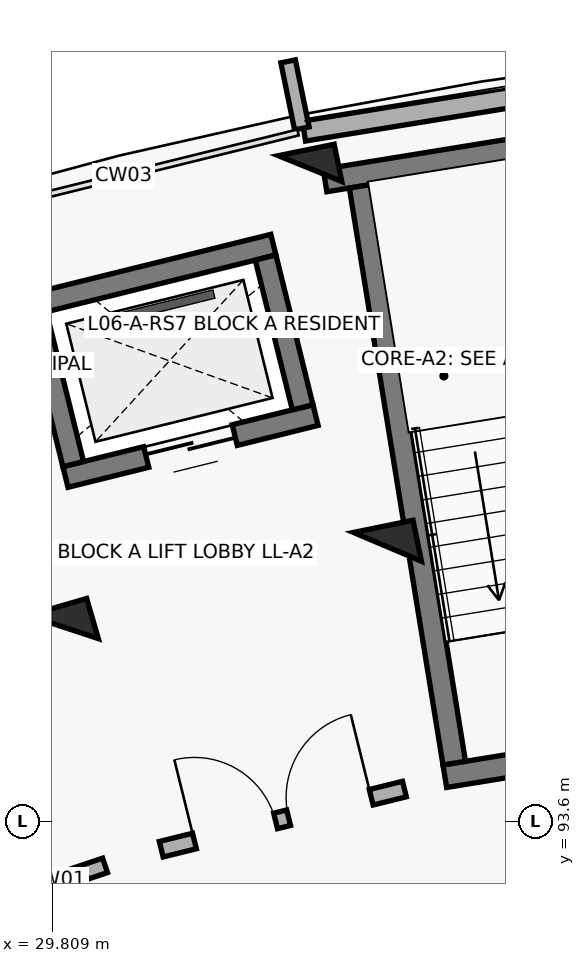
"""IFC4 building model, lengths in metres.
Left out: names, types, materials, properties, quantities, classifications, styles, units other than length and angle.
Written with IfcOpenShell. Run it as: python <this file> out.ifc"""

import sys

from ifc_helpers import new_model, si_unit, direction, frame, frame_2d, origin, origin_2d, place, context, subcontext, project, spatial, rectangle, extrude, element, fill, save


model = new_model("IFC4")
c1 = context("Model", 3, precision=1e-05, world=origin(), true_north=direction((0.0, 1.0)))
c2 = subcontext(c1, "Body", "Model", "MODEL_VIEW")
j1 = project(units=[si_unit("LENGTHUNIT", "METRE"), si_unit("PLANEANGLEUNIT", "RADIAN")], contexts=[c1])
p1 = place(None, origin())
s1 = spatial("IfcSite", under=j1, at=p1, CompositionType="ELEMENT")
p2 = place(p1, origin())
s2 = spatial("IfcBuilding", under=s1, at=p2, CompositionType="ELEMENT")
p3 = place(p2, frame((0.0, 0.0, 20.5)))
s3 = spatial("IfcBuildingStorey", under=s2, at=p3, CompositionType="ELEMENT", Elevation=20.5)
for number, where, z_axis, x_axis in (
    (1, (29.954, 96.153, 0.0), (0.0, 0.0, 1.0), (-0.28, 0.96, 0.0)),
    (2, (34.219, 97.209, 0.0), (0.0, 0.0, 1.0), (-0.2, 0.98, 0.0)),
):
    element("IfcColumn", number, at=place(p3, frame(where, z_axis=z_axis, x_axis=x_axis)), inside=s3, PredefinedType="COLUMN", context=c2, shape_type="SweptSolid", body=[
        extrude(rectangle(XDim=0.55, YDim=0.8, at=origin_2d()), origin(), (0.0, 0.0, 1.0), 3.1),
    ])
p4 = place(p3, frame((33.201, 102.186, 0.0), z_axis=(0.0, 0.0, 1.0), x_axis=(-0.200393999665, 0.979715389742, 0.0)))
e3 = element("IfcColumn", 3, at=p4, inside=s3, PredefinedType="COLUMN", context=c2, shape_type="SweptSolid", body=[
    extrude(rectangle(XDim=0.5, YDim=0.75, at=origin_2d()), origin(), (0.0, 0.0, 1.0), 3.1),
])
p5 = place(p3, frame((33.12, 102.679, 0.0), z_axis=(0.0, 0.0, 1.0), x_axis=(0.987080750493, 0.160223568819, 0.0)))
e4 = element("IfcWall", 4, at=p5, inside=s3, PredefinedType="SOLIDWALL", context=c2, shape_type="SweptSolid", body=[
    extrude(rectangle(XDim=4.809, YDim=0.265, at=frame_2d((2.404, 0.0))), origin(), (0.0, 0.0, 1.0), 2.25),
])
p6 = place(p3, frame((33.093, 102.715, 0.0), z_axis=(0.0, 0.0, 1.0), x_axis=(-0.200183211319, 0.979758481416, 0.0)))
e5 = element("IfcWall", 5, at=p6, inside=s3, PredefinedType="PARAPET", context=c2, shape_type="SweptSolid", body=[
    extrude(rectangle(XDim=0.9, YDim=0.195, at=frame_2d((0.45, 0.0))), origin(), (0.0, 0.0, 1.0), 2.25),
])
p7 = place(p3, frame((38.794, 94.811, 0.0), z_axis=(0.0, 0.0, 1.0), x_axis=(-0.987077443397, -0.160243941341, 0.0)))
e6 = element("IfcWall", 6, at=p7, inside=s3, PredefinedType="SHEAR", context=c2, shape_type="SweptSolid", body=[
    extrude(rectangle(XDim=3.87, YDim=0.3, at=frame_2d((1.935, 0.0))), origin(), (0.0, 0.0, 1.0), 3.1),
])
p8 = place(p7, frame((1.41, 0.0, 0.0)))
e7 = element("IfcOpeningElement", 7, at=p8, cuts=e6, PredefinedType="OPENING", context=c2, shape_type="SweptSolid", body=[
    extrude(rectangle(XDim=1.05, YDim=2.15, at=frame_2d((0.525, 1.075))), frame((0.0, 0.16, 0.0), z_axis=(0.0, -1.0, 0.0), x_axis=(1.0, 0.0, 0.0)), (0.0, 0.0, 1.0), 0.32),
])
p9 = place(p3, frame((37.81, 102.745, 0.0), z_axis=(0.0, 0.0, 1.0), x_axis=(-0.987084710126, -0.160199173019, 0.0)))
e8 = element("IfcWall", 8, at=p9, inside=s3, PredefinedType="SHEAR", context=c2, shape_type="SweptSolid", body=[
    extrude(rectangle(XDim=4.47, YDim=0.3, at=frame_2d((2.235, 0.0))), origin(), (0.0, 0.0, 1.0), 3.1),
])
p10 = place(p3, frame((35.098, 94.363, 0.0), z_axis=(0.0, 0.0, 1.0), x_axis=(-0.160227496777, 0.987080112897, 0.0)))
e9 = element("IfcWall", 9, at=p10, inside=s3, PredefinedType="SHEAR", context=c2, shape_type="SweptSolid", body=[
    extrude(rectangle(XDim=7.69, YDim=0.3, at=frame_2d((3.845, 0.0))), origin(), (0.0, 0.0, 1.0), 3.1),
])
p11 = place(p3, frame((33.273, 98.942, 0.0), z_axis=(0.0, 0.0, 1.0), x_axis=(-0.970707542441, -0.240264160972, 0.0)))
e10 = element("IfcWall", 10, at=p11, inside=s3, PredefinedType="SHEAR", context=c2, shape_type="SweptSolid", body=[
    extrude(rectangle(XDim=3.39, YDim=0.28, at=frame_2d((1.695, 0.0))), origin(), (0.0, 0.0, 1.0), 3.1),
])
p12 = place(p11, frame((1.095, 0.0, 0.0)))
e11 = element("IfcOpeningElement", 11, at=p12, cuts=e10, PredefinedType="OPENING", context=c2, shape_type="SweptSolid", body=[
    extrude(rectangle(XDim=1.2, YDim=2.15, at=frame_2d((0.6, 1.075))), frame((0.0, 0.15, 0.0), z_axis=(0.0, -1.0, 0.0), x_axis=(1.0, 0.0, 0.0)), (0.0, 0.0, 1.0), 0.3),
])
p13 = place(p3, frame((32.718, 101.185, 0.0), z_axis=(0.0, 0.0, 1.0), x_axis=(-0.970711699588, -0.240247364777, 0.0)))
e12 = element("IfcWall", 12, at=p13, inside=s3, PredefinedType="SHEAR", context=c2, shape_type="SweptSolid", body=[
    extrude(rectangle(XDim=3.39, YDim=0.28, at=frame_2d((1.695, 0.0))), origin(), (0.0, 0.0, 1.0), 3.1),
])
p14 = place(p3, frame((33.104, 99.044, 0.0), z_axis=(0.0, 0.0, 1.0), x_axis=(-0.240186044774, 0.970726873995, 0.0)))
e13 = element("IfcWall", 13, at=p14, inside=s3, PredefinedType="SHEAR", context=c2, shape_type="SweptSolid", body=[
    extrude(rectangle(XDim=2.03, YDim=0.28, at=frame_2d((1.015, 0.0))), origin(), (0.0, 0.0, 1.0), 3.1),
])
p15 = place(p3, frame((30.085, 98.297, 0.0), z_axis=(0.0, 0.0, 1.0), x_axis=(-0.2402993748, 0.970698825832, 0.0)))
e14 = element("IfcWall", 14, at=p15, inside=s3, PredefinedType="SHEAR", context=c2, shape_type="SweptSolid", body=[
    extrude(rectangle(XDim=2.03, YDim=0.28, at=frame_2d((1.015, 0.0))), origin(), (0.0, 0.0, 1.0), 3.1),
])
p16 = place(p3, frame((27.247, 91.923, 0.0), z_axis=(0.0, 0.0, 1.0), x_axis=(0.947863007629, 0.318678080151, 0.0)))
e15 = element("IfcWall", 15, at=p16, inside=s3, PredefinedType="SOLIDWALL", context=c2, shape_type="SweptSolid", body=[
    extrude(rectangle(XDim=3.436, YDim=0.2, at=frame_2d((1.718, 0.0))), origin(), (0.0, 0.0, 1.0), 2.08),
])
p17 = place(p16, frame((1.228, 0.0, 0.0)))
e16 = element("IfcOpeningElement", 16, at=p17, cuts=e15, PredefinedType="OPENING", context=c2, shape_type="SweptSolid", body=[
    extrude(rectangle(XDim=0.98, YDim=2.15, at=frame_2d((0.49, 1.075))), frame((0.0, 0.11, 0.0), z_axis=(0.0, -1.0, 0.0), x_axis=(1.0, 0.0, 0.0)), (0.0, 0.0, 1.0), 0.22),
])
p18 = place(p3, frame((31.243, 93.23, 0.0), z_axis=(0.0, 0.0, 1.0), x_axis=(0.970719238682, 0.240216901263, 0.0)))
e17 = element("IfcWall", 17, at=p18, inside=s3, PredefinedType="SOLIDWALL", context=c2, shape_type="SweptSolid", body=[
    extrude(rectangle(XDim=3.296, YDim=0.21, at=frame_2d((1.648, 0.0))), origin(), (0.0, 0.0, 1.0), 2.08),
])
p19 = place(p18, frame((0.45, 0.0, 0.0)))
e18 = element("IfcOpeningElement", 18, at=p19, cuts=e17, PredefinedType="OPENING", context=c2, shape_type="SweptSolid", body=[
    extrude(rectangle(XDim=1.1, YDim=2.15, at=frame_2d((0.55, 1.075))), frame((0.0, 0.115, 0.0), z_axis=(0.0, -1.0, 0.0), x_axis=(1.0, 0.0, 0.0)), (0.0, 0.0, 1.0), 0.23),
])
p20 = place(p18, frame((1.726, 0.0, 0.0)))
e19 = element("IfcOpeningElement", 19, at=p20, cuts=e17, PredefinedType="OPENING", context=c2, shape_type="SweptSolid", body=[
    extrude(rectangle(XDim=1.12, YDim=2.15, at=frame_2d((0.56, 1.075))), frame((0.0, 0.115, 0.0), z_axis=(0.0, -1.0, 0.0), x_axis=(1.0, 0.0, 0.0)), (0.0, 0.0, 1.0), 0.23),
])
p21 = place(p3, frame((35.676, 92.181, 0.0), z_axis=(0.0, 0.0, 1.0), x_axis=(0.98707079686, 0.160284877599, 0.0)))
e20 = element("IfcWall", 20, at=p21, inside=s3, PredefinedType="SOLIDWALL", context=c2, shape_type="SweptSolid", body=[
    extrude(rectangle(XDim=3.129, YDim=0.21, at=frame_2d((1.564, 0.0))), origin(), (0.0, 0.0, 1.0), 2.08),
])
p22 = place(p21, frame((1.014, 0.0, 0.0)))
e21 = element("IfcOpeningElement", 21, at=p22, cuts=e20, PredefinedType="OPENING", context=c2, shape_type="SweptSolid", body=[
    extrude(rectangle(XDim=1.1, YDim=2.15, at=frame_2d((0.55, 1.075))), frame((0.0, 0.115, 0.0), z_axis=(0.0, -1.0, 0.0), x_axis=(1.0, 0.0, 0.0)), (0.0, 0.0, 1.0), 0.23),
])
p23 = place(p12, origin())
e22 = element("IfcDoor", 22, at=p23, inside=s3, OperationType="DOUBLE_DOOR_SLIDING", PredefinedType="DOOR", context=c2, shape_type="SweptSolid", body=[
    extrude(rectangle(XDim=1.2, YDim=2.15, at=frame_2d((0.6, 1.075))), frame((0.0, 0.025, 0.0), z_axis=(0.0, -1.0, 0.0), x_axis=(1.0, 0.0, 0.0)), (0.0, 0.0, 1.0), 0.05),
])
fill(e11, e22)
p24 = place(p19, origin())
e23 = element("IfcDoor", 23, at=p24, inside=s3, OperationType="SINGLE_SWING_LEFT", PredefinedType="DOOR", context=c2, shape_type="SweptSolid", body=[
    extrude(rectangle(XDim=1.1, YDim=2.15, at=frame_2d((0.55, 1.075))), frame((0.0, 0.025, 0.0), z_axis=(0.0, -1.0, 0.0), x_axis=(1.0, 0.0, 0.0)), (0.0, 0.0, 1.0), 0.05),
])
fill(e18, e23)
p25 = place(p20, origin())
e24 = element("IfcDoor", 24, at=p25, inside=s3, OperationType="SINGLE_SWING_RIGHT", PredefinedType="DOOR", context=c2, shape_type="SweptSolid", body=[
    extrude(rectangle(XDim=1.12, YDim=2.15, at=frame_2d((0.56, 1.075))), frame((0.0, 0.025, 0.0), z_axis=(0.0, -1.0, 0.0), x_axis=(1.0, 0.0, 0.0)), (0.0, 0.0, 1.0), 0.05),
])
fill(e19, e24)
save(model, sys.argv[1])
